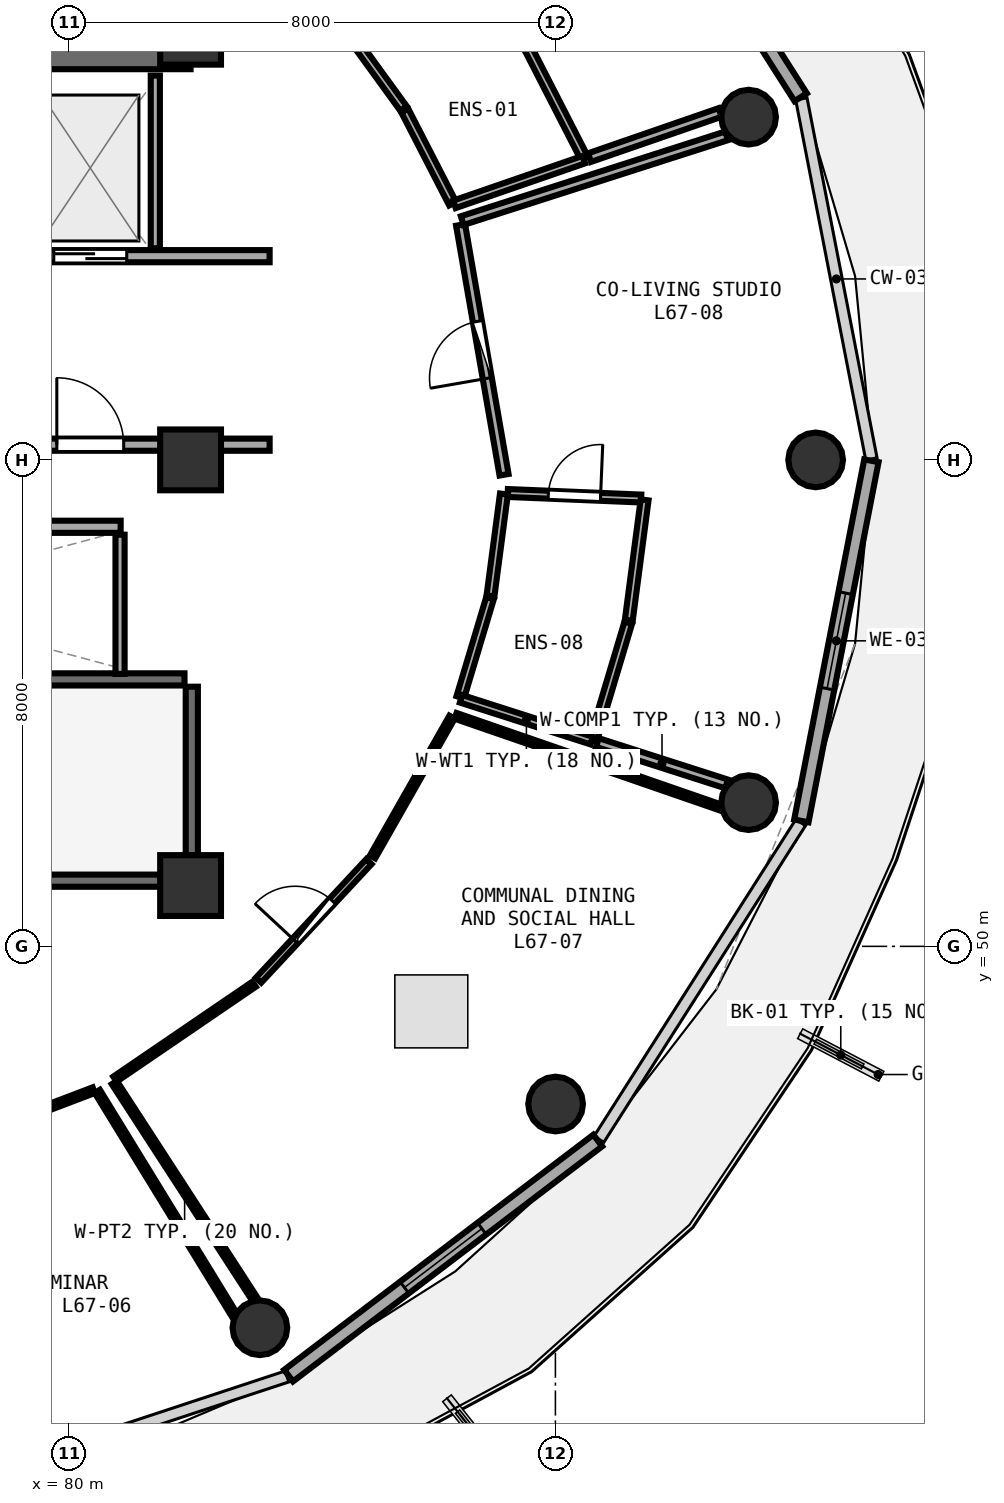
"""IFC4 building model, lengths in metres.
Left out: names, types, materials, properties, quantities, classifications, styles, units other than length and angle.
Written with IfcOpenShell. Run it as: python <this file> out.ifc"""

import sys

from ifc_helpers import new_model, si_unit, direction, frame, frame_2d, origin, origin_2d, place, context, subcontext, project, spatial, rectangle, circle, extrude, element, fill, save


model = new_model("IFC4")
c1 = context("Model", 3, precision=1e-05, world=origin(), true_north=direction((0.0, 1.0)))
c2 = subcontext(c1, "Body", "Model", "MODEL_VIEW")
j1 = project(units=[si_unit("LENGTHUNIT", "METRE"), si_unit("PLANEANGLEUNIT", "RADIAN")], contexts=[c1])
p1 = place(None, origin())
s1 = spatial("IfcSite", under=j1, at=p1, CompositionType="ELEMENT")
p2 = place(p1, origin())
s2 = spatial("IfcBuilding", under=s1, at=p2, CompositionType="ELEMENT")
p3 = place(p2, frame((0.0, 0.0, 263.7)))
s3 = spatial("IfcBuildingStorey", under=s2, at=p3, CompositionType="ELEMENT", Elevation=263.7)
for number, where, z_axis, x_axis in (
    (1, (82.0, 51.0, 0.0), (0.0, 0.0, 1.0), (1.0, 0.0, 0.0)),
    (2, (82.0, 58.0, 0.0), (0.0, 0.0, 1.0), (1.0, 0.0, 0.0)),
    (3, (82.0, 65.0, 0.0), (0.0, 0.0, 1.0), (1.0, 0.0, 0.0)),
):
    element("IfcColumn", number, at=place(p3, frame(where, z_axis=z_axis, x_axis=x_axis)), inside=s3, PredefinedType="PILASTER", context=c2, shape_type="SweptSolid", body=[
        extrude(rectangle(XDim=1.0, YDim=1.0, at=origin_2d()), origin(), (0.0, 0.0, 1.0), 3.75),
    ])
for number, where, z_axis, x_axis in (
    (4, (92.28, 58.0, 0.0), (0.0, 0.0, 1.0), (1.0, 0.0, 0.0)),
    (5, (91.177, 63.636, 0.0), (0.0, 0.0, 1.0), (1.0, 0.0, 0.0)),
    (6, (83.14, 43.728, 0.0), (0.0, 0.0, 1.0), (1.0, 0.0, 0.0)),
    (7, (88.003, 47.407, 0.0), (0.0, 0.0, 1.0), (1.0, 0.0, 0.0)),
    (8, (91.177, 52.364, 0.0), (0.0, 0.0, 1.0), (1.0, 0.0, 0.0)),
):
    element("IfcColumn", number, at=place(p3, frame(where, z_axis=z_axis, x_axis=x_axis)), inside=s3, PredefinedType="COLUMN", context=c2, shape_type="SweptSolid", body=[
        extrude(circle(Radius=0.45, at=origin_2d()), origin(), (0.0, 0.0, 1.0), 3.75),
    ])
p4 = place(p3, frame((92.034, 63.964, 0.0), z_axis=(0.0, 0.0, 1.0), x_axis=(-0.537271968456, 0.843409053728, 0.0)))
e9 = element("IfcWall", 9, at=p4, inside=s3, PredefinedType="SOLIDWALL", context=c2, shape_type="SweptSolid", body=[
    extrude(rectangle(XDim=6.175, YDim=0.24, at=frame_2d((3.087, 0.0))), origin(), (0.0, 0.0, 1.0), 3.475),
])
p5 = place(p4, frame((2.613, 0.0, 0.0)))
e10 = element("IfcOpeningElement", 10, at=p5, cuts=e9, PredefinedType="OPENING", context=c2, shape_type="SweptSolid", body=[
    extrude(rectangle(XDim=0.95, YDim=2.1, at=frame_2d((0.475, 1.05))), frame((0.0, 0.13, 0.0), z_axis=(0.0, -1.0, 0.0), x_axis=(1.0, 0.0, 0.0)), (0.0, 0.0, 1.0), 0.26),
])
p6 = place(p4, frame((3.913, 0.0, 0.85)))
e11 = element("IfcOpeningElement", 11, at=p6, cuts=e9, PredefinedType="OPENING", context=c2, shape_type="SweptSolid", body=[
    extrude(rectangle(XDim=1.2, YDim=1.45, at=frame_2d((0.6, 0.725))), frame((0.0, 0.13, 0.0), z_axis=(0.0, -1.0, 0.0), x_axis=(1.0, 0.0, 0.0)), (0.0, 0.0, 1.0), 0.26),
])
p7 = place(p3, frame((83.612, 42.94, 0.0), z_axis=(0.0, 0.0, 1.0), x_axis=(0.796010444211, 0.605282886514, 0.0)))
e12 = element("IfcWall", 12, at=p7, inside=s3, PredefinedType="SOLIDWALL", context=c2, shape_type="SweptSolid", body=[
    extrude(rectangle(XDim=6.387, YDim=0.24, at=frame_2d((3.194, 0.0))), origin(), (0.0, 0.0, 1.0), 3.475),
])
p8 = place(p7, frame((2.394, 0.0, 0.85)))
e13 = element("IfcOpeningElement", 13, at=p8, cuts=e12, PredefinedType="OPENING", context=c2, shape_type="SweptSolid", body=[
    extrude(rectangle(XDim=1.6, YDim=1.45, at=frame_2d((0.8, 0.725))), frame((0.0, 0.13, 0.0), z_axis=(0.0, -1.0, 0.0), x_axis=(1.0, 0.0, 0.0)), (0.0, 0.0, 1.0), 0.26),
])
p9 = place(p3, frame((92.045, 52.063, 0.0), z_axis=(0.0, 0.0, 1.0), x_axis=(0.190969309115, 0.981596008028, 0.0)))
e14 = element("IfcWall", 14, at=p9, inside=s3, PredefinedType="SOLIDWALL", context=c2, shape_type="SweptSolid", body=[
    extrude(rectangle(XDim=6.033, YDim=0.24, at=frame_2d((3.017, 0.0))), origin(), (0.0, 0.0, 1.0), 3.475),
])
p10 = place(p9, frame((2.216, 0.0, 0.85)))
e15 = element("IfcOpeningElement", 15, at=p10, cuts=e14, PredefinedType="OPENING", context=c2, shape_type="SweptSolid", body=[
    extrude(rectangle(XDim=1.6, YDim=1.45, at=frame_2d((0.8, 0.725))), frame((0.0, 0.13, 0.0), z_axis=(0.0, -1.0, 0.0), x_axis=(1.0, 0.0, 0.0)), (0.0, 0.0, 1.0), 0.26),
])
p11 = place(p3, frame((74.0, 51.08, 0.0), z_axis=(0.0, 0.0, 1.0), x_axis=(1.0, 0.0, 0.0)))
e16 = element("IfcWall", 16, at=p11, inside=s3, PredefinedType="SHEAR", context=c2, shape_type="SweptSolid", body=[
    extrude(rectangle(XDim=7.9, YDim=0.2, at=frame_2d((3.95, 0.0))), origin(), (0.0, 0.0, 1.0), 3.49),
])
p12 = place(p11, frame((1.12, 0.0, 0.0)))
e17 = element("IfcOpeningElement", 17, at=p12, cuts=e16, PredefinedType="OPENING", context=c2, shape_type="SweptSolid", body=[
    extrude(rectangle(XDim=1.05, YDim=2.1, at=frame_2d((0.525, 1.05))), frame((0.0, 0.11, 0.0), z_axis=(0.0, -1.0, 0.0), x_axis=(1.0, 0.0, 0.0)), (0.0, 0.0, 1.0), 0.22),
])
p13 = place(p3, frame((82.02, 51.2, 0.0), z_axis=(0.0, 0.0, 1.0), x_axis=(0.0, 1.0, 0.0)))
e18 = element("IfcWall", 18, at=p13, inside=s3, PredefinedType="SHEAR", context=c2, shape_type="SweptSolid", body=[
    extrude(rectangle(XDim=3.07, YDim=0.2, at=frame_2d((1.535, 0.0))), origin(), (0.0, 0.0, 1.0), 3.49),
])
p14 = place(p3, frame((81.9, 54.39, 0.0), z_axis=(0.0, 0.0, 1.0), x_axis=(-1.0, 0.0, 0.0)))
e19 = element("IfcWall", 19, at=p14, inside=s3, PredefinedType="SHEAR", context=c2, shape_type="SweptSolid", body=[
    extrude(rectangle(XDim=8.46, YDim=0.2, at=frame_2d((4.23, 0.0))), origin(), (0.0, 0.0, 1.0), 3.49),
])
p15 = place(p3, frame((74.0, 64.6, 0.0), z_axis=(0.0, 0.0, 1.0), x_axis=(1.0, 0.0, 0.0)))
e20 = element("IfcWall", 20, at=p15, inside=s3, PredefinedType="SHEAR", context=c2, shape_type="SweptSolid", body=[
    extrude(rectangle(XDim=8.0, YDim=0.35, at=frame_2d((4.0, 0.0))), origin(), (0.0, 0.0, 1.0), 3.49),
])
p16 = place(p3, frame((79.3, 61.35, 0.0), z_axis=(0.0, 0.0, 1.0), x_axis=(1.0, 0.0, 0.0)))
e21 = element("IfcWall", 21, at=p16, inside=s3, PredefinedType="SOLIDWALL", context=c2, shape_type="SweptSolid", body=[
    extrude(rectangle(XDim=4.0, YDim=0.2, at=frame_2d((2.0, 0.0))), origin(), (0.0, 0.0, 1.0), 2.775),
])
p17 = place(p16, frame((0.45, 0.0, 0.0)))
e22 = element("IfcOpeningElement", 22, at=p17, cuts=e21, PredefinedType="OPENING", context=c2, shape_type="SweptSolid", body=[
    extrude(rectangle(XDim=1.2, YDim=2.15, at=frame_2d((0.6, 1.075))), frame((0.0, 0.11, 0.0), z_axis=(0.0, -1.0, 0.0), x_axis=(1.0, 0.0, 0.0)), (0.0, 0.0, 1.0), 0.22),
])
p18 = place(p3, frame((81.42, 61.48, 0.0), z_axis=(0.0, 0.0, 1.0), x_axis=(0.0, 1.0, 0.0)))
e23 = element("IfcWall", 23, at=p18, inside=s3, PredefinedType="PARTITIONING", context=c2, shape_type="SweptSolid", body=[
    extrude(rectangle(XDim=2.84, YDim=0.15, at=frame_2d((1.42, 0.0))), origin(), (0.0, 0.0, 1.0), 3.48),
])
p19 = place(p3, frame((79.3, 58.25, 0.0), z_axis=(0.0, 0.0, 1.0), x_axis=(1.0, 0.0, 0.0)))
e24 = element("IfcWall", 24, at=p19, inside=s3, PredefinedType="SOLIDWALL", context=c2, shape_type="SweptSolid", body=[
    extrude(rectangle(XDim=4.0, YDim=0.2, at=frame_2d((2.0, 0.0))), origin(), (0.0, 0.0, 1.0), 2.775),
])
p20 = place(p19, frame((0.5, 0.0, 0.0)))
e25 = element("IfcOpeningElement", 25, at=p20, cuts=e24, PredefinedType="OPENING", context=c2, shape_type="SweptSolid", body=[
    extrude(rectangle(XDim=1.1, YDim=2.1, at=frame_2d((0.55, 1.05))), frame((0.0, 0.11, 0.0), z_axis=(0.0, -1.0, 0.0), x_axis=(1.0, 0.0, 0.0)), (0.0, 0.0, 1.0), 0.22),
])
p21 = place(p3, frame((72.45, 56.9, 0.0), z_axis=(0.0, 0.0, 1.0), x_axis=(1.0, 0.0, 0.0)))
e26 = element("IfcWall", 26, at=p21, inside=s3, PredefinedType="SOLIDWALL", context=c2, shape_type="SweptSolid", body=[
    extrude(rectangle(XDim=8.4, YDim=0.2, at=frame_2d((4.2, 0.0))), origin(), (0.0, 0.0, 1.0), 3.48),
])
p22 = place(p21, frame((0.4, 0.0, 0.0)))
e27 = element("IfcOpeningElement", 27, at=p22, cuts=e26, PredefinedType="OPENING", context=c2, shape_type="SweptSolid", body=[
    extrude(rectangle(XDim=1.1, YDim=2.1, at=frame_2d((0.55, 1.05))), frame((0.0, 0.11, 0.0), z_axis=(0.0, -1.0, 0.0), x_axis=(1.0, 0.0, 0.0)), (0.0, 0.0, 1.0), 0.22),
])
p23 = place(p21, frame((2.4, 0.0, 0.0)))
e28 = element("IfcOpeningElement", 28, at=p23, cuts=e26, PredefinedType="OPENING", context=c2, shape_type="SweptSolid", body=[
    extrude(rectangle(XDim=1.1, YDim=2.1, at=frame_2d((0.55, 1.05))), frame((0.0, 0.11, 0.0), z_axis=(0.0, -1.0, 0.0), x_axis=(1.0, 0.0, 0.0)), (0.0, 0.0, 1.0), 0.22),
])
p24 = place(p3, frame((80.84, 54.48, 0.0), z_axis=(0.0, 0.0, 1.0), x_axis=(0.0, 1.0, 0.0)))
e29 = element("IfcWall", 29, at=p24, inside=s3, PredefinedType="PARTITIONING", context=c2, shape_type="SweptSolid", body=[
    extrude(rectangle(XDim=2.29, YDim=0.15, at=frame_2d((1.145, 0.0))), origin(), (0.0, 0.0, 1.0), 3.48),
])
p25 = place(p3, frame((83.118, 49.443, 0.0), z_axis=(0.0, 0.0, 1.0), x_axis=(0.681315269885, 0.731990097625, 0.0)))
e30 = element("IfcWall", 30, at=p25, inside=s3, PredefinedType="PARTITIONING", context=c2, shape_type="SweptSolid", body=[
    extrude(rectangle(XDim=2.664, YDim=0.12, at=frame_2d((1.332, 0.0))), origin(), (0.0, 0.0, 1.0), 3.075),
])
p26 = place(p25, frame((0.882, 0.0, 0.0)))
e31 = element("IfcOpeningElement", 31, at=p26, cuts=e30, PredefinedType="OPENING", context=c2, shape_type="SweptSolid", body=[
    extrude(rectangle(XDim=0.9, YDim=2.08, at=frame_2d((0.45, 1.04))), frame((0.0, 0.07, 0.0), z_axis=(0.0, -1.0, 0.0), x_axis=(1.0, 0.0, 0.0)), (0.0, 0.0, 1.0), 0.14),
])
p27 = place(p3, frame((87.216, 57.456, 0.0), z_axis=(0.0, 0.0, 1.0), x_axis=(0.999139994921, -0.041464087462, 0.0)))
e32 = element("IfcWall", 32, at=p27, inside=s3, PredefinedType="PLUMBINGWALL", context=c2, shape_type="SweptSolid", body=[
    extrude(rectangle(XDim=2.196, YDim=0.13, at=frame_2d((1.098, 0.0))), origin(), (0.0, 0.0, 1.0), 3.175),
])
p28 = place(p27, frame((0.668, 0.0, 0.0)))
e33 = element("IfcOpeningElement", 33, at=p28, cuts=e32, PredefinedType="OPENING", context=c2, shape_type="SweptSolid", body=[
    extrude(rectangle(XDim=0.86, YDim=2.05, at=frame_2d((0.43, 1.025))), frame((0.0, 0.075, 0.0), z_axis=(0.0, -1.0, 0.0), x_axis=(1.0, 0.0, 0.0)), (0.0, 0.0, 1.0), 0.15),
])
p29 = place(p3, frame((87.156, 57.755, 0.0), z_axis=(0.0, 0.0, 1.0), x_axis=(-0.171570913007, 0.985171772743, 0.0)))
e34 = element("IfcWall", 34, at=p29, inside=s3, PredefinedType="PARTITIONING", context=c2, shape_type="SweptSolid", body=[
    extrude(rectangle(XDim=4.171, YDim=0.15, at=frame_2d((2.085, 0.0))), origin(), (0.0, 0.0, 1.0), 3.075),
])
p30 = place(p29, frame((1.61, 0.0, 0.0)))
e35 = element("IfcOpeningElement", 35, at=p30, cuts=e34, PredefinedType="OPENING", context=c2, shape_type="SweptSolid", body=[
    extrude(rectangle(XDim=0.95, YDim=2.08, at=frame_2d((0.475, 1.04))), frame((0.0, 0.085, 0.0), z_axis=(0.0, -1.0, 0.0), x_axis=(1.0, 0.0, 0.0)), (0.0, 0.0, 1.0), 0.17),
])
p31 = place(p3, frame((86.311, 62.214, 0.0), z_axis=(0.0, 0.0, 1.0), x_axis=(-0.457623641393, 0.889145996357, 0.0)))
e36 = element("IfcWall", 36, at=p31, inside=s3, PredefinedType="PLUMBINGWALL", context=c2, shape_type="SweptSolid", body=[
    extrude(rectangle(XDim=1.721, YDim=0.13, at=frame_2d((0.86, 0.0))), origin(), (0.0, 0.0, 1.0), 3.235),
])
p32 = place(p3, frame((85.502, 63.778, 0.0), z_axis=(0.0, 0.0, 1.0), x_axis=(-0.587439614451, 0.809268002193, 0.0)))
e37 = element("IfcWall", 37, at=p32, inside=s3, PredefinedType="PLUMBINGWALL", context=c2, shape_type="SweptSolid", body=[
    extrude(rectangle(XDim=1.746, YDim=0.13, at=frame_2d((0.873, 0.0))), origin(), (0.0, 0.0, 1.0), 3.075),
])
p33 = place(p3, frame((87.548, 64.772, 0.0), z_axis=(0.0, 0.0, 1.0), x_axis=(0.456453063126, -0.889747492923, 0.0)))
e38 = element("IfcWall", 38, at=p33, inside=s3, PredefinedType="PLUMBINGWALL", context=c2, shape_type="SweptSolid", body=[
    extrude(rectangle(XDim=2.035, YDim=0.13, at=frame_2d((1.017, 0.0))), origin(), (0.0, 0.0, 1.0), 3.075),
])
p34 = place(p3, frame((88.467, 62.938, 0.0), z_axis=(0.0, 0.0, 1.0), x_axis=(-0.94520115701, -0.326488549244, 0.0)))
e39 = element("IfcWall", 39, at=p34, inside=s3, PredefinedType="PLUMBINGWALL", context=c2, shape_type="SweptSolid", body=[
    extrude(rectangle(XDim=2.251, YDim=0.13, at=frame_2d((1.126, 0.0))), origin(), (0.0, 0.0, 1.0), 3.175),
])
p35 = place(p3, frame((90.709, 63.713, 0.0), z_axis=(0.0, 0.0, 1.0), x_axis=(-0.945132905081, -0.326686075207, 0.0)))
e40 = element("IfcWall", 40, at=p35, inside=s3, PredefinedType="PARTITIONING", context=c2, shape_type="SweptSolid", body=[
    extrude(rectangle(XDim=2.272, YDim=0.15, at=frame_2d((1.136, 0.0))), origin(), (0.0, 0.0, 1.0), 3.075),
])
p36 = place(p3, frame((77.763, 46.629, 0.0), z_axis=(0.0, 0.0, 1.0), x_axis=(0.934691278896, 0.355460564839, 0.0)))
e41 = element("IfcWall", 41, at=p36, inside=s3, PredefinedType="PARTITIONING", context=c2, shape_type="SweptSolid", body=[
    extrude(rectangle(XDim=2.829, YDim=0.1, at=frame_2d((1.415, 0.0))), origin(), (0.0, 0.0, 1.0), 3.48),
])
p37 = place(p3, frame((80.466, 47.615, 0.0), z_axis=(0.0, 0.0, 1.0), x_axis=(0.522784059663, -0.852465147066, 0.0)))
e42 = element("IfcWall", 42, at=p37, inside=s3, PredefinedType="PARTITIONING", context=c2, shape_type="SweptSolid", body=[
    extrude(rectangle(XDim=4.306, YDim=0.1, at=frame_2d((2.153, 0.0))), origin(), (0.0, 0.0, 1.0), 3.175),
])
p38 = place(p3, frame((80.757, 47.816, 0.0), z_axis=(0.0, 0.0, 1.0), x_axis=(0.826087380575, 0.563542047814, 0.0)))
e43 = element("IfcWall", 43, at=p38, inside=s3, PredefinedType="PARTITIONING", context=c2, shape_type="SweptSolid", body=[
    extrude(rectangle(XDim=2.768, YDim=0.1, at=frame_2d((1.384, 0.0))), origin(), (0.0, 0.0, 1.0), 3.075),
])
p39 = place(p3, frame((84.994, 51.472, 0.0), z_axis=(0.0, 0.0, 1.0), x_axis=(0.494277588427, 0.869304127207, 0.0)))
e44 = element("IfcWall", 44, at=p39, inside=s3, PredefinedType="PARTITIONING", context=c2, shape_type="SweptSolid", body=[
    extrude(rectangle(XDim=2.643, YDim=0.1, at=frame_2d((1.322, 0.0))), origin(), (0.0, 0.0, 1.0), 3.075),
])
p40 = place(p3, frame((86.358, 53.791, 0.0), z_axis=(0.0, 0.0, 1.0), x_axis=(0.945103281494, -0.326771766388, 0.0)))
e45 = element("IfcWall", 45, at=p40, inside=s3, PredefinedType="PARTITIONING", context=c2, shape_type="SweptSolid", body=[
    extrude(rectangle(XDim=4.604, YDim=0.1, at=frame_2d((2.302, 0.0))), origin(), (0.0, 0.0, 1.0), 3.075),
])
p41 = place(p3, frame((83.058, 44.196, 0.0), z_axis=(0.0, 0.0, 1.0), x_axis=(-0.544234825024, 0.838932926539, 0.0)))
e46 = element("IfcWall", 46, at=p41, inside=s3, PredefinedType="PARTITIONING", context=c2, shape_type="SweptSolid", body=[
    extrude(rectangle(XDim=4.249, YDim=0.1, at=frame_2d((2.125, 0.0))), origin(), (0.0, 0.0, 1.0), 3.075),
])
p42 = place(p3, frame((86.436, 54.096, 0.0), z_axis=(0.0, 0.0, 1.0), x_axis=(0.287308367232, 0.957838139833, 0.0)))
e47 = element("IfcWall", 47, at=p42, inside=s3, PredefinedType="PLUMBINGWALL", context=c2, shape_type="SweptSolid", body=[
    extrude(rectangle(XDim=1.7, YDim=0.13, at=frame_2d((0.85, 0.0))), origin(), (0.0, 0.0, 1.0), 3.48),
])
p43 = place(p3, frame((86.933, 55.764, 0.0), z_axis=(0.0, 0.0, 1.0), x_axis=(0.130686363399, 0.991423761275, 0.0)))
e48 = element("IfcWall", 48, at=p43, inside=s3, PredefinedType="PLUMBINGWALL", context=c2, shape_type="SweptSolid", body=[
    extrude(rectangle(XDim=1.689, YDim=0.13, at=frame_2d((0.844, 0.0))), origin(), (0.0, 0.0, 1.0), 3.48),
])
p44 = place(p3, frame((89.467, 57.342, 0.0), z_axis=(0.0, 0.0, 1.0), x_axis=(-0.130467152696, -0.991452632286, 0.0)))
e49 = element("IfcWall", 49, at=p44, inside=s3, PredefinedType="PLUMBINGWALL", context=c2, shape_type="SweptSolid", body=[
    extrude(rectangle(XDim=1.999, YDim=0.13, at=frame_2d((0.999, 0.0))), origin(), (0.0, 0.0, 1.0), 3.48),
])
p45 = place(p3, frame((89.198, 55.322, 0.0), z_axis=(0.0, 0.0, 1.0), x_axis=(-0.286890981069, -0.957963237803, 0.0)))
e50 = element("IfcWall", 50, at=p45, inside=s3, PredefinedType="PLUMBINGWALL", context=c2, shape_type="SweptSolid", body=[
    extrude(rectangle(XDim=2.01, YDim=0.13, at=frame_2d((1.005, 0.0))), origin(), (0.0, 0.0, 1.0), 3.48),
])
p46 = place(p3, frame((88.597, 53.383, 0.0), z_axis=(0.0, 0.0, 1.0), x_axis=(-0.952372601519, 0.304936760454, 0.0)))
e51 = element("IfcWall", 51, at=p46, inside=s3, PredefinedType="PLUMBINGWALL", context=c2, shape_type="SweptSolid", body=[
    extrude(rectangle(XDim=2.255, YDim=0.13, at=frame_2d((1.128, 0.0))), origin(), (0.0, 0.0, 1.0), 3.175),
])
p47 = place(p3, frame((86.468, 61.935, 0.0), z_axis=(0.0, 0.0, 1.0), x_axis=(0.95227750557, 0.305233602976, 0.0)))
e52 = element("IfcWall", 52, at=p47, inside=s3, PredefinedType="PARTITIONING", context=c2, shape_type="SweptSolid", body=[
    extrude(rectangle(XDim=4.565, YDim=0.15, at=frame_2d((2.283, 0.0))), origin(), (0.0, 0.0, 1.0), 3.175),
])
p48 = place(p3, frame((90.816, 52.671, 0.0), z_axis=(0.0, 0.0, 1.0), x_axis=(-0.952285550261, 0.305208503755, 0.0)))
e53 = element("IfcWall", 53, at=p48, inside=s3, PredefinedType="PARTITIONING", context=c2, shape_type="SweptSolid", body=[
    extrude(rectangle(XDim=2.231, YDim=0.15, at=frame_2d((1.115, 0.0))), origin(), (0.0, 0.0, 1.0), 3.235),
])
p49 = place(p8, origin())
e54 = element("IfcWindow", 54, at=p49, inside=s3, PartitioningType="SINGLE_PANEL", PredefinedType="WINDOW", context=c2, shape_type="SweptSolid", body=[
    extrude(rectangle(XDim=1.6, YDim=1.45, at=frame_2d((0.8, 0.725))), frame((0.0, 0.03, 0.0), z_axis=(0.0, -1.0, 0.0), x_axis=(1.0, 0.0, 0.0)), (0.0, 0.0, 1.0), 0.06),
])
fill(e13, e54)
p50 = place(p10, origin())
e55 = element("IfcWindow", 55, at=p50, inside=s3, PartitioningType="SINGLE_PANEL", PredefinedType="WINDOW", context=c2, shape_type="SweptSolid", body=[
    extrude(rectangle(XDim=1.6, YDim=1.45, at=frame_2d((0.8, 0.725))), frame((0.0, 0.03, 0.0), z_axis=(0.0, -1.0, 0.0), x_axis=(1.0, 0.0, 0.0)), (0.0, 0.0, 1.0), 0.06),
])
fill(e15, e55)
p51 = place(p17, origin())
e56 = element("IfcDoor", 56, at=p51, inside=s3, OperationType="DOUBLE_DOOR_SLIDING", PredefinedType="DOOR", context=c2, shape_type="SweptSolid", body=[
    extrude(rectangle(XDim=1.2, YDim=2.15, at=frame_2d((0.6, 1.075))), frame((0.0, 0.025, 0.0), z_axis=(0.0, -1.0, 0.0), x_axis=(1.0, 0.0, 0.0)), (0.0, 0.0, 1.0), 0.05),
])
fill(e22, e56)
p52 = place(p20, frame((1.1, 0.0, 0.0), z_axis=(0.0, 0.0, 1.0), x_axis=(-1.0, 0.0, 0.0)))
e57 = element("IfcDoor", 57, at=p52, inside=s3, OperationType="SINGLE_SWING_RIGHT", PredefinedType="DOOR", context=c2, shape_type="SweptSolid", body=[
    extrude(rectangle(XDim=1.1, YDim=2.1, at=frame_2d((0.55, 1.05))), frame((0.0, 0.025, 0.0), z_axis=(0.0, -1.0, 0.0), x_axis=(1.0, 0.0, 0.0)), (0.0, 0.0, 1.0), 0.05),
])
fill(e25, e57)
p53 = place(p26, origin())
e58 = element("IfcDoor", 58, at=p53, inside=s3, OperationType="SINGLE_SWING_LEFT", PredefinedType="DOOR", context=c2, shape_type="SweptSolid", body=[
    extrude(rectangle(XDim=0.9, YDim=2.08, at=frame_2d((0.45, 1.04))), frame((0.0, 0.025, 0.0), z_axis=(0.0, -1.0, 0.0), x_axis=(1.0, 0.0, 0.0)), (0.0, 0.0, 1.0), 0.05),
])
fill(e31, e58)
p54 = place(p28, origin())
e59 = element("IfcDoor", 59, at=p54, inside=s3, OperationType="SINGLE_SWING_RIGHT", PredefinedType="DOOR", context=c2, shape_type="SweptSolid", body=[
    extrude(rectangle(XDim=0.86, YDim=2.05, at=frame_2d((0.43, 1.025))), frame((0.0, 0.025, 0.0), z_axis=(0.0, -1.0, 0.0), x_axis=(1.0, 0.0, 0.0)), (0.0, 0.0, 1.0), 0.05),
])
fill(e33, e59)
p55 = place(p30, origin())
e60 = element("IfcDoor", 60, at=p55, inside=s3, OperationType="SINGLE_SWING_LEFT", PredefinedType="DOOR", context=c2, shape_type="SweptSolid", body=[
    extrude(rectangle(XDim=0.95, YDim=2.08, at=frame_2d((0.475, 1.04))), frame((0.0, 0.025, 0.0), z_axis=(0.0, -1.0, 0.0), x_axis=(1.0, 0.0, 0.0)), (0.0, 0.0, 1.0), 0.05),
])
fill(e35, e60)
save(model, sys.argv[1])
